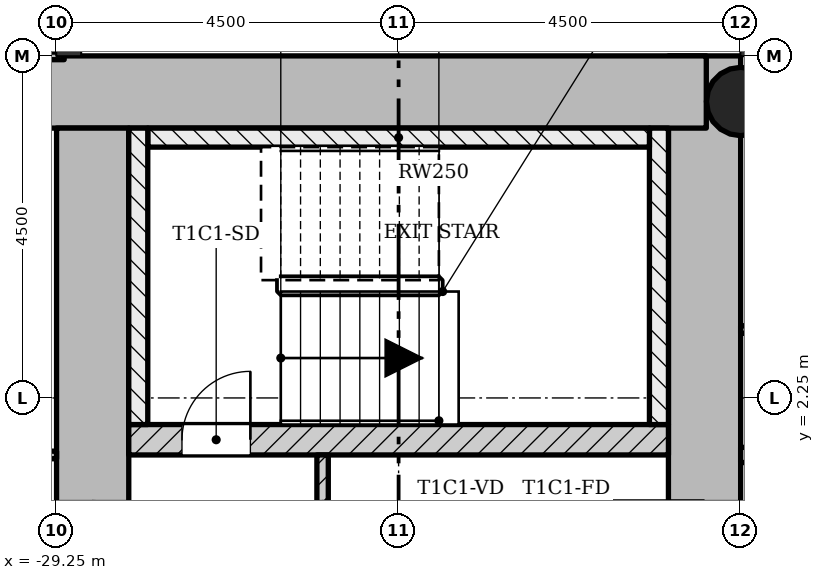
"""IFC4 building model, lengths in metres.
Left out: names, types, materials, properties, quantities, classifications, styles, units other than length and angle.
Written with IfcOpenShell. Run it as: python <this file> out.ifc"""

import sys

from ifc_helpers import new_model, si_unit, direction, frame, frame_2d, origin, origin_2d, place, context, subcontext, project, spatial, rectangle, hollow_circle, extrude, element, fill, save


model = new_model("IFC4")
c1 = context("Model", 3, precision=1e-05, world=origin(), true_north=direction((0.0, 1.0)))
c2 = subcontext(c1, "Body", "Model", "MODEL_VIEW")
j1 = project(units=[si_unit("LENGTHUNIT", "METRE"), si_unit("PLANEANGLEUNIT", "RADIAN")], contexts=[c1])
p1 = place(None, origin())
s1 = spatial("IfcSite", under=j1, at=p1, CompositionType="ELEMENT")
p2 = place(p1, origin())
s2 = spatial("IfcBuilding", under=s1, at=p2, CompositionType="ELEMENT")
p3 = place(p2, frame((0.0, 0.0, 103.8)))
s3 = spatial("IfcBuildingStorey", under=s2, at=p3, CompositionType="ELEMENT", Elevation=103.8)
p4 = place(p3, frame((-20.725, -5.8, 0.0), z_axis=(0.0, 0.0, 1.0), x_axis=(0.0, 1.0, 0.0)))
e1 = element("IfcWall", 1, at=p4, inside=s3, PredefinedType="SHEAR", context=c2, shape_type="SweptSolid", body=[
    extrude(rectangle(XDim=12.55, YDim=0.95, at=frame_2d((6.275, 0.0))), origin(), (0.0, 0.0, 1.0), 3.4),
])
p5 = place(p4, frame((4.9, 0.0, 0.0)))
e2 = element("IfcOpeningElement", 2, at=p5, cuts=e1, PredefinedType="OPENING", context=c2, shape_type="SweptSolid", body=[
    extrude(rectangle(XDim=1.8, YDim=2.1, at=frame_2d((0.9, 1.05))), frame((0.0, 0.485, 0.0), z_axis=(0.0, -1.0, 0.0), x_axis=(1.0, 0.0, 0.0)), (0.0, 0.0, 1.0), 0.97),
])
p6 = place(p3, frame((-20.702, 6.275, 0.0), z_axis=(0.0, 0.0, 1.0), x_axis=(-1.0, 0.0, 0.0)))
e3 = element("IfcWall", 3, at=p6, inside=s3, PredefinedType="SHEAR", context=c2, shape_type="SweptSolid", body=[
    extrude(rectangle(XDim=8.696, YDim=0.95, at=frame_2d((4.348, 0.0))), origin(), (0.0, 0.0, 1.0), 3.4),
])
p7 = place(p3, frame((-28.775, 5.8, 0.0), z_axis=(0.0, 0.0, 1.0), x_axis=(0.0, -1.0, 0.0)))
e4 = element("IfcWall", 4, at=p7, inside=s3, PredefinedType="SHEAR", context=c2, shape_type="SweptSolid", body=[
    extrude(rectangle(XDim=12.55, YDim=0.95, at=frame_2d((6.275, 0.0))), origin(), (0.0, 0.0, 1.0), 3.4),
])
p8 = place(p7, frame((4.9, 0.0, 0.0)))
e5 = element("IfcOpeningElement", 5, at=p8, cuts=e4, PredefinedType="OPENING", context=c2, shape_type="SweptSolid", body=[
    extrude(rectangle(XDim=1.8, YDim=2.1, at=frame_2d((0.9, 1.05))), frame((0.0, 0.485, 0.0), z_axis=(0.0, -1.0, 0.0), x_axis=(1.0, 0.0, 0.0)), (0.0, 0.0, 1.0), 0.97),
])
p9 = place(p3, frame((-28.3, 1.7, 0.0), z_axis=(0.0, 0.0, 1.0), x_axis=(1.0, 0.0, 0.0)))
e6 = element("IfcWall", 6, at=p9, inside=s3, PredefinedType="SHEAR", context=c2, shape_type="SweptSolid", body=[
    extrude(rectangle(XDim=7.1, YDim=0.4, at=frame_2d((3.55, 0.0))), origin(), (0.0, 0.0, 1.0), 3.4),
])
p10 = place(p9, frame((0.7, 0.0, 0.0)))
e7 = element("IfcOpeningElement", 7, at=p10, cuts=e6, PredefinedType="OPENING", context=c2, shape_type="SweptSolid", body=[
    extrude(rectangle(XDim=0.9, YDim=2.1, at=frame_2d((0.45, 1.05))), frame((0.0, 0.21, 0.0), z_axis=(0.0, -1.0, 0.0), x_axis=(1.0, 0.0, 0.0)), (0.0, 0.0, 1.0), 0.42),
])
p11 = place(p3, frame((-20.25, 6.15, 0.0), z_axis=(0.0, 0.0, 1.0), x_axis=(1.0, 0.0, 0.0)))
e8 = element("IfcColumn", 8, at=p11, inside=s3, PredefinedType="COLUMN", context=c2, shape_type="SweptSolid", body=[
    extrude(hollow_circle(Radius=0.45, WallThickness=0.032, at=origin_2d()), origin(), (0.0, 0.0, 1.0), 3.4),
])
p12 = place(p3, frame((-25.75, -1.5, 0.0), z_axis=(0.0, 0.0, 1.0), x_axis=(0.0, 1.0, 0.0)))
e9 = element("IfcWall", 9, at=p12, inside=s3, PredefinedType="PARTITIONING", context=c2, shape_type="SweptSolid", body=[
    extrude(rectangle(XDim=3.0, YDim=0.15, at=frame_2d((1.5, 0.0))), origin(), (0.0, 0.0, 1.0), 3.0),
])
p13 = place(p12, frame((0.6, 0.0, 0.0)))
e10 = element("IfcOpeningElement", 10, at=p13, cuts=e9, PredefinedType="OPENING", context=c2, shape_type="SweptSolid", body=[
    extrude(rectangle(XDim=1.8, YDim=2.1, at=frame_2d((0.9, 1.05))), frame((0.0, 0.085, 0.0), z_axis=(0.0, -1.0, 0.0), x_axis=(1.0, 0.0, 0.0)), (0.0, 0.0, 1.0), 0.17),
])
p14 = place(p3, frame((-35.1, 1.5, 0.0), z_axis=(0.0, 0.0, 1.0), x_axis=(1.0, 0.0, 0.0)))
e11 = element("IfcWall", 11, at=p14, inside=s3, PredefinedType="PARTITIONING", context=c2, shape_type="SweptSolid", body=[
    extrude(rectangle(XDim=5.85, YDim=0.1, at=frame_2d((2.925, 0.0))), origin(), (0.0, 0.0, 1.0), 3.0),
])
p15 = place(p14, frame((3.675, 0.0, 0.0)))
e12 = element("IfcOpeningElement", 12, at=p15, cuts=e11, PredefinedType="OPENING", context=c2, shape_type="SweptSolid", body=[
    extrude(rectangle(XDim=0.9, YDim=2.1, at=frame_2d((0.45, 1.05))), frame((0.0, 0.06, 0.0), z_axis=(0.0, -1.0, 0.0), x_axis=(1.0, 0.0, 0.0)), (0.0, 0.0, 1.0), 0.12),
])
p16 = place(p3, frame((-20.25, 1.5, 0.0), z_axis=(0.0, 0.0, 1.0), x_axis=(1.0, 0.0, 0.0)))
e13 = element("IfcWall", 13, at=p16, inside=s3, PredefinedType="SOLIDWALL", context=c2, shape_type="SweptSolid", body=[
    extrude(rectangle(XDim=4.5, YDim=0.2, at=frame_2d((2.25, 0.0))), origin(), (0.0, 0.0, 1.0), 3.0),
])
p17 = place(p16, frame((3.0, 0.0, 0.0)))
e14 = element("IfcOpeningElement", 14, at=p17, cuts=e13, PredefinedType="OPENING", context=c2, shape_type="SweptSolid", body=[
    extrude(rectangle(XDim=0.9, YDim=2.1, at=frame_2d((0.45, 1.05))), frame((0.0, 0.11, 0.0), z_axis=(0.0, -1.0, 0.0), x_axis=(1.0, 0.0, 0.0)), (0.0, 0.0, 1.0), 0.22),
])
p18 = place(p3, frame((-20.25, 3.15, 0.0), z_axis=(0.0, 0.0, 1.0), x_axis=(1.0, 0.0, 0.0)))
e15 = element("IfcWall", 15, at=p18, inside=s3, PredefinedType="PARTITIONING", context=c2, shape_type="SweptSolid", body=[
    extrude(rectangle(XDim=4.5, YDim=0.1, at=frame_2d((2.25, 0.0))), origin(), (0.0, 0.0, 1.0), 3.0),
])
p19 = place(p18, frame((3.0, 0.0, 0.0)))
e16 = element("IfcOpeningElement", 16, at=p19, cuts=e15, PredefinedType="OPENING", context=c2, shape_type="SweptSolid", body=[
    extrude(rectangle(XDim=0.9, YDim=2.1, at=frame_2d((0.45, 1.05))), frame((0.0, 0.06, 0.0), z_axis=(0.0, -1.0, 0.0), x_axis=(1.0, 0.0, 0.0)), (0.0, 0.0, 1.0), 0.12),
])
p20 = place(p3, frame((-35.1, 6.75, 0.0), z_axis=(0.0, 0.0, 1.0), x_axis=(1.0, 0.0, 0.0)))
e17 = element("IfcWall", 17, at=p20, inside=s3, PredefinedType="PARTITIONING", context=c2, shape_type="SweptSolid", body=[
    extrude(rectangle(XDim=5.95, YDim=0.1, at=frame_2d((2.975, 0.0))), origin(), (0.0, 0.0, 1.0), 3.0),
])
p21 = place(p3, frame((-21.325, 1.9, 0.0), z_axis=(0.0, 0.0, 1.0), x_axis=(0.0, 1.0, 0.0)))
e18 = element("IfcWall", 18, at=p21, inside=s3, PredefinedType="SHEAR", context=c2, shape_type="SweptSolid", body=[
    extrude(rectangle(XDim=3.9, YDim=0.25, at=frame_2d((1.95, 0.0))), origin(), (0.0, 0.0, 1.0), 3.4),
])
p22 = place(p3, frame((-28.05, 5.675, 0.0), z_axis=(0.0, 0.0, 1.0), x_axis=(1.0, 0.0, 0.0)))
e19 = element("IfcWall", 19, at=p22, inside=s3, PredefinedType="SHEAR", context=c2, shape_type="SweptSolid", body=[
    extrude(rectangle(XDim=6.6, YDim=0.25, at=frame_2d((3.3, 0.0))), origin(), (0.0, 0.0, 1.0), 3.4),
])
p23 = place(p3, frame((-28.175, 1.9, 0.0), z_axis=(0.0, 0.0, 1.0), x_axis=(0.0, 1.0, 0.0)))
e20 = element("IfcWall", 20, at=p23, inside=s3, PredefinedType="SHEAR", context=c2, shape_type="SweptSolid", body=[
    extrude(rectangle(XDim=3.9, YDim=0.25, at=frame_2d((1.95, 0.0))), origin(), (0.0, 0.0, 1.0), 3.4),
])
p24 = place(p13, origin())
e21 = element("IfcDoor", 21, at=p24, inside=s3, OperationType="SINGLE_SWING_LEFT", PredefinedType="DOOR", context=c2, shape_type="SweptSolid", body=[
    extrude(rectangle(XDim=1.8, YDim=2.1, at=frame_2d((0.9, 1.05))), frame((0.0, 0.025, 0.0), z_axis=(0.0, -1.0, 0.0), x_axis=(1.0, 0.0, 0.0)), (0.0, 0.0, 1.0), 0.05),
])
fill(e10, e21)
p25 = place(p10, origin())
e22 = element("IfcDoor", 22, at=p25, inside=s3, OperationType="SINGLE_SWING_LEFT", PredefinedType="DOOR", context=c2, shape_type="SweptSolid", body=[
    extrude(rectangle(XDim=0.9, YDim=2.1, at=frame_2d((0.45, 1.05))), frame((0.0, 0.025, 0.0), z_axis=(0.0, -1.0, 0.0), x_axis=(1.0, 0.0, 0.0)), (0.0, 0.0, 1.0), 0.05),
])
fill(e7, e22)
p26 = place(p8, origin())
e23 = element("IfcDoor", 23, at=p26, inside=s3, OperationType="SINGLE_SWING_LEFT", PredefinedType="DOOR", context=c2, shape_type="SweptSolid", body=[
    extrude(rectangle(XDim=1.8, YDim=2.1, at=frame_2d((0.9, 1.05))), frame((0.0, 0.025, 0.0), z_axis=(0.0, -1.0, 0.0), x_axis=(1.0, 0.0, 0.0)), (0.0, 0.0, 1.0), 0.05),
])
fill(e5, e23)
save(model, sys.argv[1])
